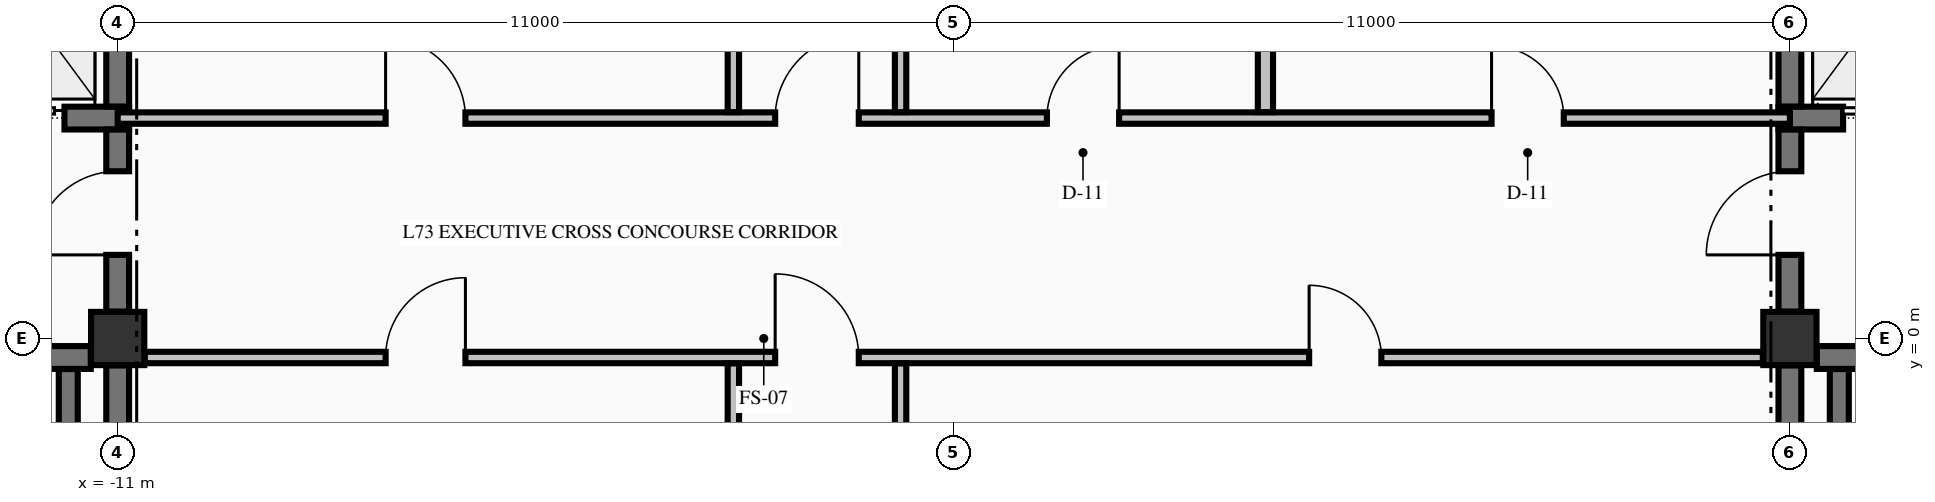
"""IFC4 building model, lengths in metres.
Left out: names, types, materials, properties, quantities, classifications, styles, units other than length and angle.
Written with IfcOpenShell. Run it as: python <this file> out.ifc"""

import sys

from ifc_helpers import new_model, si_unit, direction, frame, frame_2d, origin, origin_2d, place, context, subcontext, project, spatial, rectangle, extrude, element, fill, save


model = new_model("IFC4")
c1 = context("Model", 3, precision=1e-05, world=origin(), true_north=direction((0.0, 1.0)))
c2 = subcontext(c1, "Body", "Model", "MODEL_VIEW")
j1 = project(units=[si_unit("LENGTHUNIT", "METRE"), si_unit("PLANEANGLEUNIT", "RADIAN")], contexts=[c1])
p1 = place(None, origin())
s1 = spatial("IfcSite", under=j1, at=p1, CompositionType="ELEMENT")
p2 = place(p1, origin())
s2 = spatial("IfcBuilding", under=s1, at=p2, CompositionType="ELEMENT")
p3 = place(p2, frame((0.0, 0.0, 274.32)))
s3 = spatial("IfcBuildingStorey", under=s2, at=p3, CompositionType="ELEMENT", Elevation=274.32)
for number, where, z_axis, x_axis in (
    (1, (-11.0, 0.0, -0.25), (0.0, 0.0, 1.0), (1.0, 0.0, 0.0)),
    (2, (11.0, 0.0, -0.25), (0.0, 0.0, 1.0), (1.0, 0.0, 0.0)),
):
    element("IfcColumn", number, at=place(p3, frame(where, z_axis=z_axis, x_axis=x_axis)), inside=s3, PredefinedType="COLUMN", context=c2, shape_type="SweptSolid", body=[
        extrude(rectangle(XDim=0.7, YDim=0.7, at=origin_2d()), origin(), (0.0, 0.0, 1.0), 3.565),
    ])
p4 = place(p3, frame((-19.646, -0.25, 0.0), z_axis=(0.0, 0.0, 1.0), x_axis=(1.0, 0.0, 0.0)))
e3 = element("IfcWall", 3, at=p4, inside=s3, PredefinedType="SHEAR", context=c2, shape_type="SweptSolid", body=[
    extrude(rectangle(XDim=8.292, YDim=0.3, at=frame_2d((4.146, 0.0))), origin(), (0.0, 0.0, 1.0), 3.315),
])
p5 = place(p4, frame((5.946, 0.0, 0.0)))
e4 = element("IfcOpeningElement", 4, at=p5, cuts=e3, PredefinedType="OPENING", context=c2, shape_type="SweptSolid", body=[
    extrude(rectangle(XDim=1.1, YDim=2.15, at=frame_2d((0.55, 1.075))), frame((0.0, 0.16, 0.0), z_axis=(0.0, -1.0, 0.0), x_axis=(1.0, 0.0, 0.0)), (0.0, 0.0, 1.0), 0.32),
])
p6 = place(p3, frame((11.354, -0.25, 0.0), z_axis=(0.0, 0.0, 1.0), x_axis=(1.0, 0.0, 0.0)))
e5 = element("IfcWall", 5, at=p6, inside=s3, PredefinedType="SHEAR", context=c2, shape_type="SweptSolid", body=[
    extrude(rectangle(XDim=3.521, YDim=0.3, at=frame_2d((1.76, 0.0))), origin(), (0.0, 0.0, 1.0), 3.315),
])
p7 = place(p6, frame((1.246, 0.0, 0.0)))
e6 = element("IfcOpeningElement", 6, at=p7, cuts=e5, PredefinedType="OPENING", context=c2, shape_type="SweptSolid", body=[
    extrude(rectangle(XDim=1.1, YDim=2.15, at=frame_2d((0.55, 1.075))), frame((0.0, 0.16, 0.0), z_axis=(0.0, -1.0, 0.0), x_axis=(1.0, 0.0, 0.0)), (0.0, 0.0, 1.0), 0.32),
])
p8 = place(p3, frame((-14.875, 2.9, 0.0), z_axis=(0.0, 0.0, 1.0), x_axis=(1.0, 0.0, 0.0)))
e7 = element("IfcWall", 7, at=p8, inside=s3, PredefinedType="SHEAR", context=c2, shape_type="SweptSolid", body=[
    extrude(rectangle(XDim=4.025, YDim=0.3, at=frame_2d((2.012, 0.0))), origin(), (0.0, 0.0, 1.0), 3.315),
])
p9 = place(p8, frame((2.075, 0.0, 0.0)))
e8 = element("IfcOpeningElement", 8, at=p9, cuts=e7, PredefinedType="OPENING", context=c2, shape_type="SweptSolid", body=[
    extrude(rectangle(XDim=1.1, YDim=2.2, at=frame_2d((0.55, 1.1))), frame((0.0, 0.16, 0.0), z_axis=(0.0, -1.0, 0.0), x_axis=(1.0, 0.0, 0.0)), (0.0, 0.0, 1.0), 0.32),
])
p10 = place(p3, frame((10.85, 2.9, 0.0), z_axis=(0.0, 0.0, 1.0), x_axis=(1.0, 0.0, 0.0)))
e9 = element("IfcWall", 9, at=p10, inside=s3, PredefinedType="SHEAR", context=c2, shape_type="SweptSolid", body=[
    extrude(rectangle(XDim=4.025, YDim=0.3, at=frame_2d((2.012, 0.0))), origin(), (0.0, 0.0, 1.0), 3.315),
])
p11 = place(p10, frame((0.85, 0.0, 0.0)))
e10 = element("IfcOpeningElement", 10, at=p11, cuts=e9, PredefinedType="OPENING", context=c2, shape_type="SweptSolid", body=[
    extrude(rectangle(XDim=1.1, YDim=2.2, at=frame_2d((0.55, 1.1))), frame((0.0, 0.16, 0.0), z_axis=(0.0, -1.0, 0.0), x_axis=(1.0, 0.0, 0.0)), (0.0, 0.0, 1.0), 0.32),
])
p12 = place(p3, frame((-10.644, -0.25, 0.0), z_axis=(0.0, 0.0, 1.0), x_axis=(1.0, 0.0, 0.0)))
e11 = element("IfcWall", 11, at=p12, inside=s3, PredefinedType="PARTITIONING", context=c2, shape_type="SweptSolid", body=[
    extrude(rectangle(XDim=21.288, YDim=0.15, at=frame_2d((10.644, 0.0))), origin(), (0.0, 0.0, 1.0), 3.315),
])
p13 = place(p12, frame((8.294, 0.0, 0.0)))
e12 = element("IfcOpeningElement", 12, at=p13, cuts=e11, PredefinedType="OPENING", context=c2, shape_type="SweptSolid", body=[
    extrude(rectangle(XDim=1.1, YDim=2.15, at=frame_2d((0.55, 1.075))), frame((0.0, 0.085, 0.0), z_axis=(0.0, -1.0, 0.0), x_axis=(1.0, 0.0, 0.0)), (0.0, 0.0, 1.0), 0.17),
])
p14 = place(p12, frame((3.169, 0.0, 0.0)))
e13 = element("IfcOpeningElement", 13, at=p14, cuts=e11, PredefinedType="OPENING", context=c2, shape_type="SweptSolid", body=[
    extrude(rectangle(XDim=1.05, YDim=2.15, at=frame_2d((0.525, 1.075))), frame((0.0, 0.085, 0.0), z_axis=(0.0, -1.0, 0.0), x_axis=(1.0, 0.0, 0.0)), (0.0, 0.0, 1.0), 0.17),
])
p15 = place(p12, frame((15.319, 0.0, 0.0)))
e14 = element("IfcOpeningElement", 14, at=p15, cuts=e11, PredefinedType="OPENING", context=c2, shape_type="SweptSolid", body=[
    extrude(rectangle(XDim=0.95, YDim=2.15, at=frame_2d((0.475, 1.075))), frame((0.0, 0.085, 0.0), z_axis=(0.0, -1.0, 0.0), x_axis=(1.0, 0.0, 0.0)), (0.0, 0.0, 1.0), 0.17),
])
p16 = place(p3, frame((-11.0, 2.9, 0.0), z_axis=(0.0, 0.0, 1.0), x_axis=(1.0, 0.0, 0.0)))
e15 = element("IfcWall", 15, at=p16, inside=s3, PredefinedType="PARTITIONING", context=c2, shape_type="SweptSolid", body=[
    extrude(rectangle(XDim=22.0, YDim=0.15, at=frame_2d((11.0, 0.0))), origin(), (0.0, 0.0, 1.0), 3.315),
])
p17 = place(p16, frame((8.65, 0.0, 0.0)))
e16 = element("IfcOpeningElement", 16, at=p17, cuts=e15, PredefinedType="OPENING", context=c2, shape_type="SweptSolid", body=[
    extrude(rectangle(XDim=1.1, YDim=2.15, at=frame_2d((0.55, 1.075))), frame((0.0, 0.085, 0.0), z_axis=(0.0, -1.0, 0.0), x_axis=(1.0, 0.0, 0.0)), (0.0, 0.0, 1.0), 0.17),
])
p18 = place(p16, frame((3.525, 0.0, 0.0)))
e17 = element("IfcOpeningElement", 17, at=p18, cuts=e15, PredefinedType="OPENING", context=c2, shape_type="SweptSolid", body=[
    extrude(rectangle(XDim=1.05, YDim=2.15, at=frame_2d((0.525, 1.075))), frame((0.0, 0.085, 0.0), z_axis=(0.0, -1.0, 0.0), x_axis=(1.0, 0.0, 0.0)), (0.0, 0.0, 1.0), 0.17),
])
p19 = place(p16, frame((12.225, 0.0, 0.0)))
e18 = element("IfcOpeningElement", 18, at=p19, cuts=e15, PredefinedType="OPENING", context=c2, shape_type="SweptSolid", body=[
    extrude(rectangle(XDim=0.95, YDim=2.15, at=frame_2d((0.475, 1.075))), frame((0.0, 0.085, 0.0), z_axis=(0.0, -1.0, 0.0), x_axis=(1.0, 0.0, 0.0)), (0.0, 0.0, 1.0), 0.17),
])
p20 = place(p16, frame((18.075, 0.0, 0.0)))
e19 = element("IfcOpeningElement", 19, at=p20, cuts=e15, PredefinedType="OPENING", context=c2, shape_type="SweptSolid", body=[
    extrude(rectangle(XDim=0.95, YDim=2.15, at=frame_2d((0.475, 1.075))), frame((0.0, 0.085, 0.0), z_axis=(0.0, -1.0, 0.0), x_axis=(1.0, 0.0, 0.0)), (0.0, 0.0, 1.0), 0.17),
])
p21 = place(p3, frame((-11.65, -9.798, 0.0), z_axis=(0.0, 0.0, 1.0), x_axis=(0.0, 1.0, 0.0)))
e20 = element("IfcWall", 20, at=p21, inside=s3, PredefinedType="SOLIDWALL", context=c2, shape_type="SweptSolid", body=[
    extrude(rectangle(XDim=9.396, YDim=0.25, at=frame_2d((4.698, 0.0))), origin(), (0.0, 0.0, 1.0), 3.315),
])
p22 = place(p3, frame((-11.0, -9.596, 0.0), z_axis=(0.0, 0.0, 1.0), x_axis=(0.0, 1.0, 0.0)))
e21 = element("IfcWall", 21, at=p22, inside=s3, PredefinedType="SHEAR", context=c2, shape_type="SweptSolid", body=[
    extrude(rectangle(XDim=9.242, YDim=0.3, at=frame_2d((4.621, 0.0))), origin(), (0.0, 0.0, 1.0), 3.315),
])
p23 = place(p3, frame((-11.0, 0.354, 0.0), z_axis=(0.0, 0.0, 1.0), x_axis=(0.0, 1.0, 0.0)))
e22 = element("IfcWall", 22, at=p23, inside=s3, PredefinedType="SHEAR", context=c2, shape_type="SweptSolid", body=[
    extrude(rectangle(XDim=2.394, YDim=0.3, at=frame_2d((1.197, 0.0))), origin(), (0.0, 0.0, 1.0), 3.315),
])
p24 = place(p23, frame((0.746, 0.0, 0.0)))
e23 = element("IfcOpeningElement", 23, at=p24, cuts=e22, PredefinedType="OPENING", context=c2, shape_type="SweptSolid", body=[
    extrude(rectangle(XDim=1.1, YDim=2.15, at=frame_2d((0.55, 1.075))), frame((0.0, 0.16, 0.0), z_axis=(0.0, -1.0, 0.0), x_axis=(1.0, 0.0, 0.0)), (0.0, 0.0, 1.0), 0.32),
])
p25 = place(p3, frame((-11.0, 3.052, 0.0), z_axis=(0.0, 0.0, 1.0), x_axis=(0.0, 1.0, 0.0)))
e24 = element("IfcWall", 24, at=p25, inside=s3, PredefinedType="SHEAR", context=c2, shape_type="SweptSolid", body=[
    extrude(rectangle(XDim=2.496, YDim=0.3, at=frame_2d((1.248, 0.0))), origin(), (0.0, 0.0, 1.0), 3.315),
])
p26 = place(p3, frame((11.0, -9.596, 0.0), z_axis=(0.0, 0.0, 1.0), x_axis=(0.0, 1.0, 0.0)))
e25 = element("IfcWall", 25, at=p26, inside=s3, PredefinedType="SHEAR", context=c2, shape_type="SweptSolid", body=[
    extrude(rectangle(XDim=9.242, YDim=0.3, at=frame_2d((4.621, 0.0))), origin(), (0.0, 0.0, 1.0), 3.315),
])
p27 = place(p3, frame((11.0, 0.354, 0.0), z_axis=(0.0, 0.0, 1.0), x_axis=(0.0, 1.0, 0.0)))
e26 = element("IfcWall", 26, at=p27, inside=s3, PredefinedType="SHEAR", context=c2, shape_type="SweptSolid", body=[
    extrude(rectangle(XDim=2.394, YDim=0.3, at=frame_2d((1.197, 0.0))), origin(), (0.0, 0.0, 1.0), 3.315),
])
p28 = place(p27, frame((0.746, 0.0, 0.0)))
e27 = element("IfcOpeningElement", 27, at=p28, cuts=e26, PredefinedType="OPENING", context=c2, shape_type="SweptSolid", body=[
    extrude(rectangle(XDim=1.1, YDim=2.15, at=frame_2d((0.55, 1.075))), frame((0.0, 0.16, 0.0), z_axis=(0.0, -1.0, 0.0), x_axis=(1.0, 0.0, 0.0)), (0.0, 0.0, 1.0), 0.32),
])
p29 = place(p3, frame((11.0, 3.052, 0.0), z_axis=(0.0, 0.0, 1.0), x_axis=(0.0, 1.0, 0.0)))
e28 = element("IfcWall", 28, at=p29, inside=s3, PredefinedType="SHEAR", context=c2, shape_type="SweptSolid", body=[
    extrude(rectangle(XDim=2.496, YDim=0.3, at=frame_2d((1.248, 0.0))), origin(), (0.0, 0.0, 1.0), 3.315),
])
p30 = place(p3, frame((11.65, -9.798, 0.0), z_axis=(0.0, 0.0, 1.0), x_axis=(0.0, 1.0, 0.0)))
e29 = element("IfcWall", 29, at=p30, inside=s3, PredefinedType="SOLIDWALL", context=c2, shape_type="SweptSolid", body=[
    extrude(rectangle(XDim=9.396, YDim=0.25, at=frame_2d((4.698, 0.0))), origin(), (0.0, 0.0, 1.0), 3.315),
])
p31 = place(p3, frame((-2.9, -9.872, 0.0), z_axis=(0.0, 0.0, 1.0), x_axis=(0.0, 1.0, 0.0)))
e30 = element("IfcWall", 30, at=p31, inside=s3, PredefinedType="PARTITIONING", context=c2, shape_type="SweptSolid", body=[
    extrude(rectangle(XDim=9.544, YDim=0.15, at=frame_2d((4.772, 0.0))), origin(), (0.0, 0.0, 1.0), 3.315),
])
p32 = place(p3, frame((-2.9, 2.978, 0.0), z_axis=(0.0, 0.0, 1.0), x_axis=(0.0, 1.0, 0.0)))
e31 = element("IfcWall", 31, at=p32, inside=s3, PredefinedType="PARTITIONING", context=c2, shape_type="SweptSolid", body=[
    extrude(rectangle(XDim=7.444, YDim=0.15, at=frame_2d((3.722, 0.0))), origin(), (0.0, 0.0, 1.0), 3.315),
])
p33 = place(p3, frame((-0.7, -4.147, 0.0), z_axis=(0.0, 0.0, 1.0), x_axis=(0.0, 1.0, 0.0)))
e32 = element("IfcWall", 32, at=p33, inside=s3, PredefinedType="PARTITIONING", context=c2, shape_type="SweptSolid", body=[
    extrude(rectangle(XDim=3.819, YDim=0.15, at=frame_2d((1.91, 0.0))), origin(), (0.0, 0.0, 1.0), 3.315),
])
p34 = place(p3, frame((-0.7, 2.978, 0.0), z_axis=(0.0, 0.0, 1.0), x_axis=(0.0, 1.0, 0.0)))
e33 = element("IfcWall", 33, at=p34, inside=s3, PredefinedType="PARTITIONING", context=c2, shape_type="SweptSolid", body=[
    extrude(rectangle(XDim=7.444, YDim=0.15, at=frame_2d((3.722, 0.0))), origin(), (0.0, 0.0, 1.0), 3.315),
])
p35 = place(p3, frame((4.1, 2.978, 0.0), z_axis=(0.0, 0.0, 1.0), x_axis=(0.0, 1.0, 0.0)))
e34 = element("IfcWall", 34, at=p35, inside=s3, PredefinedType="PARTITIONING", context=c2, shape_type="SweptSolid", body=[
    extrude(rectangle(XDim=7.444, YDim=0.2, at=frame_2d((3.722, 0.0))), origin(), (0.0, 0.0, 1.0), 3.315),
])
p36 = place(p24, origin())
e35 = element("IfcDoor", 35, at=p36, inside=s3, OperationType="SINGLE_SWING_LEFT", PredefinedType="DOOR", context=c2, shape_type="SweptSolid", body=[
    extrude(rectangle(XDim=1.1, YDim=2.15, at=frame_2d((0.55, 1.075))), frame((0.0, 0.025, 0.0), z_axis=(0.0, -1.0, 0.0), x_axis=(1.0, 0.0, 0.0)), (0.0, 0.0, 1.0), 0.05),
])
fill(e23, e35)
p37 = place(p9, origin())
e36 = element("IfcDoor", 36, at=p37, inside=s3, OperationType="SLIDING_TO_LEFT", PredefinedType="DOOR", context=c2, shape_type="SweptSolid", body=[
    extrude(rectangle(XDim=1.1, YDim=2.2, at=frame_2d((0.55, 1.1))), frame((0.0, 0.025, 0.0), z_axis=(0.0, -1.0, 0.0), x_axis=(1.0, 0.0, 0.0)), (0.0, 0.0, 1.0), 0.05),
])
fill(e8, e36)
p38 = place(p28, origin())
e37 = element("IfcDoor", 37, at=p38, inside=s3, OperationType="SINGLE_SWING_LEFT", PredefinedType="DOOR", context=c2, shape_type="SweptSolid", body=[
    extrude(rectangle(XDim=1.1, YDim=2.15, at=frame_2d((0.55, 1.075))), frame((0.0, 0.025, 0.0), z_axis=(0.0, -1.0, 0.0), x_axis=(1.0, 0.0, 0.0)), (0.0, 0.0, 1.0), 0.05),
])
fill(e27, e37)
p39 = place(p11, origin())
e38 = element("IfcDoor", 38, at=p39, inside=s3, OperationType="SLIDING_TO_RIGHT", PredefinedType="DOOR", context=c2, shape_type="SweptSolid", body=[
    extrude(rectangle(XDim=1.1, YDim=2.2, at=frame_2d((0.55, 1.1))), frame((0.0, 0.025, 0.0), z_axis=(0.0, -1.0, 0.0), x_axis=(1.0, 0.0, 0.0)), (0.0, 0.0, 1.0), 0.05),
])
fill(e10, e38)
p40 = place(p17, origin())
e39 = element("IfcDoor", 39, at=p40, inside=s3, OperationType="SINGLE_SWING_RIGHT", PredefinedType="DOOR", context=c2, shape_type="SweptSolid", body=[
    extrude(rectangle(XDim=1.1, YDim=2.15, at=frame_2d((0.55, 1.075))), frame((0.0, 0.025, 0.0), z_axis=(0.0, -1.0, 0.0), x_axis=(1.0, 0.0, 0.0)), (0.0, 0.0, 1.0), 0.05),
])
fill(e16, e39)
p41 = place(p13, origin())
e40 = element("IfcDoor", 40, at=p41, inside=s3, OperationType="SINGLE_SWING_LEFT", PredefinedType="DOOR", context=c2, shape_type="SweptSolid", body=[
    extrude(rectangle(XDim=1.1, YDim=2.15, at=frame_2d((0.55, 1.075))), frame((0.0, 0.025, 0.0), z_axis=(0.0, -1.0, 0.0), x_axis=(1.0, 0.0, 0.0)), (0.0, 0.0, 1.0), 0.05),
])
fill(e12, e40)
p42 = place(p18, origin())
e41 = element("IfcDoor", 41, at=p42, inside=s3, OperationType="SINGLE_SWING_LEFT", PredefinedType="DOOR", context=c2, shape_type="SweptSolid", body=[
    extrude(rectangle(XDim=1.05, YDim=2.15, at=frame_2d((0.525, 1.075))), frame((0.0, 0.025, 0.0), z_axis=(0.0, -1.0, 0.0), x_axis=(1.0, 0.0, 0.0)), (0.0, 0.0, 1.0), 0.05),
])
fill(e17, e41)
p43 = place(p19, origin())
e42 = element("IfcDoor", 42, at=p43, inside=s3, OperationType="SINGLE_SWING_RIGHT", PredefinedType="DOOR", context=c2, shape_type="SweptSolid", body=[
    extrude(rectangle(XDim=0.95, YDim=2.15, at=frame_2d((0.475, 1.075))), frame((0.0, 0.025, 0.0), z_axis=(0.0, -1.0, 0.0), x_axis=(1.0, 0.0, 0.0)), (0.0, 0.0, 1.0), 0.05),
])
fill(e18, e42)
p44 = place(p20, origin())
e43 = element("IfcDoor", 43, at=p44, inside=s3, OperationType="SINGLE_SWING_LEFT", PredefinedType="DOOR", context=c2, shape_type="SweptSolid", body=[
    extrude(rectangle(XDim=0.95, YDim=2.15, at=frame_2d((0.475, 1.075))), frame((0.0, 0.025, 0.0), z_axis=(0.0, -1.0, 0.0), x_axis=(1.0, 0.0, 0.0)), (0.0, 0.0, 1.0), 0.05),
])
fill(e19, e43)
p45 = place(p14, origin())
e44 = element("IfcDoor", 44, at=p45, inside=s3, OperationType="SINGLE_SWING_RIGHT", PredefinedType="DOOR", context=c2, shape_type="SweptSolid", body=[
    extrude(rectangle(XDim=1.05, YDim=2.15, at=frame_2d((0.525, 1.075))), frame((0.0, 0.025, 0.0), z_axis=(0.0, -1.0, 0.0), x_axis=(1.0, 0.0, 0.0)), (0.0, 0.0, 1.0), 0.05),
])
fill(e13, e44)
p46 = place(p15, origin())
e45 = element("IfcDoor", 45, at=p46, inside=s3, OperationType="SINGLE_SWING_LEFT", PredefinedType="DOOR", context=c2, shape_type="SweptSolid", body=[
    extrude(rectangle(XDim=0.95, YDim=2.15, at=frame_2d((0.475, 1.075))), frame((0.0, 0.025, 0.0), z_axis=(0.0, -1.0, 0.0), x_axis=(1.0, 0.0, 0.0)), (0.0, 0.0, 1.0), 0.05),
])
fill(e14, e45)
save(model, sys.argv[1])
